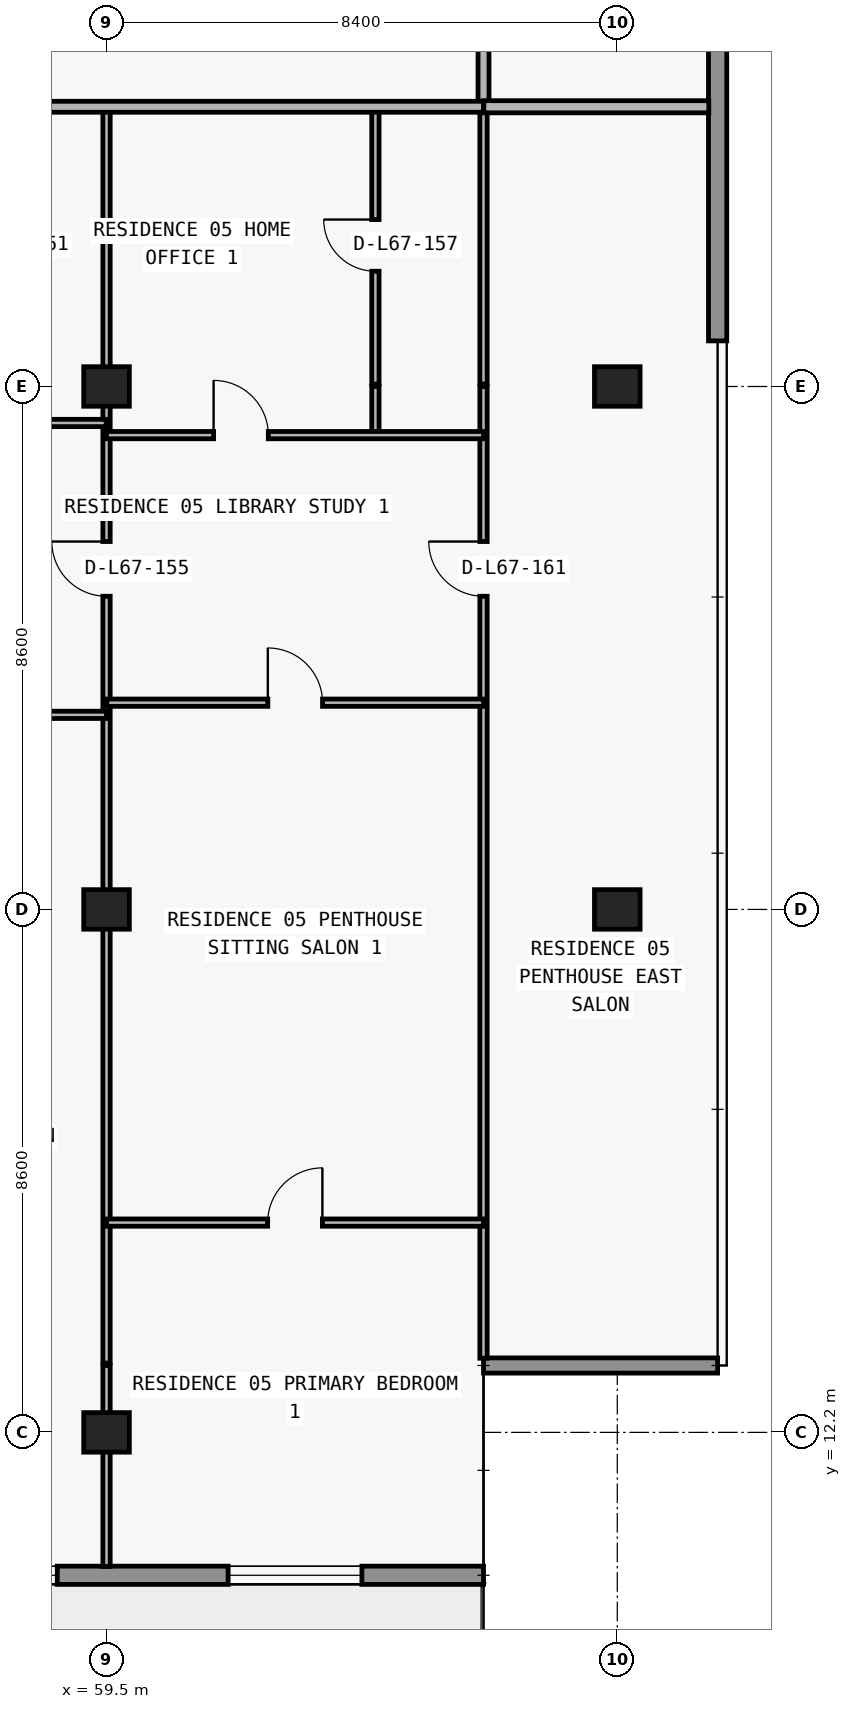
"""IFC4 building model, lengths in metres.
Left out: names, types, materials, properties, quantities, classifications, styles, units other than length and angle.
Written with IfcOpenShell. Run it as: python <this file> out.ifc"""

import sys

from ifc_helpers import new_model, si_unit, direction, frame, frame_2d, origin, origin_2d, place, context, subcontext, project, spatial, rectangle, extrude, element, fill, save


model = new_model("IFC4")
c1 = context("Model", 3, precision=1e-05, world=origin(), true_north=direction((0.0, 1.0)))
c2 = subcontext(c1, "Body", "Model", "MODEL_VIEW")
j1 = project(units=[si_unit("LENGTHUNIT", "METRE"), si_unit("PLANEANGLEUNIT", "RADIAN")], contexts=[c1])
p1 = place(None, origin())
s1 = spatial("IfcSite", under=j1, at=p1, CompositionType="ELEMENT")
p2 = place(p1, origin())
s2 = spatial("IfcBuilding", under=s1, at=p2, CompositionType="ELEMENT")
p3 = place(p2, frame((0.0, 0.0, 239.7)))
s3 = spatial("IfcBuildingStorey", under=s2, at=p3, CompositionType="ELEMENT", Elevation=239.7)
for number, where, z_axis, x_axis in (
    (1, (59.5, 12.2, 0.0), (0.0, 0.0, 1.0), (1.0, 0.0, 0.0)),
    (2, (59.5, 20.8, 0.0), (0.0, 0.0, 1.0), (1.0, 0.0, 0.0)),
    (3, (67.9, 20.8, 0.0), (0.0, 0.0, 1.0), (1.0, 0.0, 0.0)),
    (4, (59.5, 29.4, 0.0), (0.0, 0.0, 1.0), (1.0, 0.0, 0.0)),
    (5, (67.9, 29.4, 0.0), (0.0, 0.0, 1.0), (1.0, 0.0, 0.0)),
):
    element("IfcColumn", number, at=place(p3, frame(where, z_axis=z_axis, x_axis=x_axis)), inside=s3, PredefinedType="COLUMN", context=c2, shape_type="SweptSolid", body=[
        extrude(rectangle(XDim=0.75, YDim=0.65, at=origin_2d()), origin(), (0.0, 0.0, 1.0), 3.05),
    ])
p4 = place(p3, frame((65.7, 9.85, 0.0), z_axis=(0.0, 0.0, 1.0), x_axis=(-1.0, 0.0, 0.0)))
e6 = element("IfcWall", 6, at=p4, inside=s3, PredefinedType="STANDARD", context=c2, shape_type="SweptSolid", body=[
    extrude(rectangle(XDim=53.6, YDim=0.3, at=frame_2d((26.8, 0.0))), origin(), (0.0, 0.0, 1.0), 3.05),
])
p5 = place(p4, frame((49.5, 0.0, 0.0)))
e7 = element("IfcOpeningElement", 7, at=p5, cuts=e6, PredefinedType="OPENING", context=c2, shape_type="SweptSolid", body=[
    extrude(rectangle(XDim=2.0, YDim=2.3, at=frame_2d((1.0, 1.15))), frame((0.0, 0.16, 0.0), z_axis=(0.0, -1.0, 0.0), x_axis=(1.0, 0.0, 0.0)), (0.0, 0.0, 1.0), 0.32),
])
p6 = place(p4, frame((42.1, 0.0, 0.85)))
e8 = element("IfcOpeningElement", 8, at=p6, cuts=e6, PredefinedType="OPENING", context=c2, shape_type="SweptSolid", body=[
    extrude(rectangle(XDim=2.2, YDim=1.55, at=frame_2d((1.1, 0.775))), frame((0.0, 0.16, 0.0), z_axis=(0.0, -1.0, 0.0), x_axis=(1.0, 0.0, 0.0)), (0.0, 0.0, 1.0), 0.32),
])
p7 = place(p4, frame((35.69, 0.0, 0.0)))
e9 = element("IfcOpeningElement", 9, at=p7, cuts=e6, PredefinedType="OPENING", context=c2, shape_type="SweptSolid", body=[
    extrude(rectangle(XDim=2.0, YDim=2.3, at=frame_2d((1.0, 1.15))), frame((0.0, 0.16, 0.0), z_axis=(0.0, -1.0, 0.0), x_axis=(1.0, 0.0, 0.0)), (0.0, 0.0, 1.0), 0.32),
])
p8 = place(p4, frame((31.59, 0.0, 0.85)))
e10 = element("IfcOpeningElement", 10, at=p8, cuts=e6, PredefinedType="OPENING", context=c2, shape_type="SweptSolid", body=[
    extrude(rectangle(XDim=1.8, YDim=1.55, at=frame_2d((0.9, 0.775))), frame((0.0, 0.16, 0.0), z_axis=(0.0, -1.0, 0.0), x_axis=(1.0, 0.0, 0.0)), (0.0, 0.0, 1.0), 0.32),
])
p9 = place(p4, frame((23.914, 0.0, 0.85)))
e11 = element("IfcOpeningElement", 11, at=p9, cuts=e6, PredefinedType="OPENING", context=c2, shape_type="SweptSolid", body=[
    extrude(rectangle(XDim=2.2, YDim=1.55, at=frame_2d((1.1, 0.775))), frame((0.0, 0.16, 0.0), z_axis=(0.0, -1.0, 0.0), x_axis=(1.0, 0.0, 0.0)), (0.0, 0.0, 1.0), 0.32),
])
p10 = place(p4, frame((19.69, 0.0, 0.0)))
e12 = element("IfcOpeningElement", 12, at=p10, cuts=e6, PredefinedType="OPENING", context=c2, shape_type="SweptSolid", body=[
    extrude(rectangle(XDim=2.0, YDim=2.3, at=frame_2d((1.0, 1.15))), frame((0.0, 0.16, 0.0), z_axis=(0.0, -1.0, 0.0), x_axis=(1.0, 0.0, 0.0)), (0.0, 0.0, 1.0), 0.32),
])
p11 = place(p4, frame((15.59, 0.0, 0.85)))
e13 = element("IfcOpeningElement", 13, at=p11, cuts=e6, PredefinedType="OPENING", context=c2, shape_type="SweptSolid", body=[
    extrude(rectangle(XDim=1.8, YDim=1.55, at=frame_2d((0.9, 0.775))), frame((0.0, 0.16, 0.0), z_axis=(0.0, -1.0, 0.0), x_axis=(1.0, 0.0, 0.0)), (0.0, 0.0, 1.0), 0.32),
])
p12 = place(p4, frame((11.69, 0.0, 0.0)))
e14 = element("IfcOpeningElement", 14, at=p12, cuts=e6, PredefinedType="OPENING", context=c2, shape_type="SweptSolid", body=[
    extrude(rectangle(XDim=2.0, YDim=2.3, at=frame_2d((1.0, 1.15))), frame((0.0, 0.16, 0.0), z_axis=(0.0, -1.0, 0.0), x_axis=(1.0, 0.0, 0.0)), (0.0, 0.0, 1.0), 0.32),
])
p13 = place(p4, frame((7.01, 0.0, 0.65)))
e15 = element("IfcOpeningElement", 15, at=p13, cuts=e6, PredefinedType="OPENING", context=c2, shape_type="SweptSolid", body=[
    extrude(rectangle(XDim=2.6, YDim=1.85, at=frame_2d((1.3, 0.925))), frame((0.0, 0.16, 0.0), z_axis=(0.0, -1.0, 0.0), x_axis=(1.0, 0.0, 0.0)), (0.0, 0.0, 1.0), 0.32),
])
p14 = place(p4, frame((2.0, 0.0, 0.85)))
e16 = element("IfcOpeningElement", 16, at=p14, cuts=e6, PredefinedType="OPENING", context=c2, shape_type="SweptSolid", body=[
    extrude(rectangle(XDim=2.2, YDim=1.55, at=frame_2d((1.1, 0.775))), frame((0.0, 0.16, 0.0), z_axis=(0.0, -1.0, 0.0), x_axis=(1.0, 0.0, 0.0)), (0.0, 0.0, 1.0), 0.32),
])
p15 = place(p3, frame((65.7, 13.3, 0.0), z_axis=(0.0, 0.0, 1.0), x_axis=(1.0, 0.0, 0.0)))
e17 = element("IfcWall", 17, at=p15, inside=s3, PredefinedType="ELEMENTEDWALL", context=c2, shape_type="SweptSolid", body=[
    extrude(rectangle(XDim=3.85, YDim=0.25, at=frame_2d((1.925, 0.0))), origin(), (0.0, 0.0, 1.0), 3.05),
])
p16 = place(p3, frame((69.55, 47.0, 0.0), z_axis=(0.0, 0.0, 1.0), x_axis=(0.0, -1.0, 0.0)))
e18 = element("IfcWall", 18, at=p16, inside=s3, PredefinedType="STANDARD", context=c2, shape_type="SweptSolid", body=[
    extrude(rectangle(XDim=16.85, YDim=0.3, at=frame_2d((8.425, 0.0))), origin(), (0.0, 0.0, 1.0), 3.05),
])
p17 = place(p3, frame((59.5, 9.995, 0.0), z_axis=(0.0, 0.0, 1.0), x_axis=(0.0, 1.0, 0.0)))
e19 = element("IfcWall", 19, at=p17, inside=s3, PredefinedType="PARTITIONING", context=c2, shape_type="SweptSolid", body=[
    extrude(rectangle(XDim=3.305, YDim=0.12, at=frame_2d((1.652, 0.0))), origin(), (0.0, 0.0, 1.0), 2.263),
])
p18 = place(p3, frame((59.5, 13.34, 0.0), z_axis=(0.0, 0.0, 1.0), x_axis=(0.0, 1.0, 0.0)))
e20 = element("IfcWall", 20, at=p18, inside=s3, PredefinedType="PARTITIONING", context=c2, shape_type="SweptSolid", body=[
    extrude(rectangle(XDim=16.06, YDim=0.12, at=frame_2d((8.03, 0.0))), origin(), (0.0, 0.0, 1.0), 2.263),
])
p19 = place(p18, frame((12.61, 0.0, 0.0)))
e21 = element("IfcOpeningElement", 21, at=p19, cuts=e20, PredefinedType="OPENING", context=c2, shape_type="SweptSolid", body=[
    extrude(rectangle(XDim=0.9, YDim=2.15, at=frame_2d((0.45, 1.075))), frame((0.0, 0.07, 0.0), z_axis=(0.0, -1.0, 0.0), x_axis=(1.0, 0.0, 0.0)), (0.0, 0.0, 1.0), 0.14),
])
p20 = place(p3, frame((59.5, 29.44, 0.0), z_axis=(0.0, 0.0, 1.0), x_axis=(0.0, 1.0, 0.0)))
e22 = element("IfcWall", 22, at=p20, inside=s3, PredefinedType="PARTITIONING", context=c2, shape_type="SweptSolid", body=[
    extrude(rectangle(XDim=4.56, YDim=0.12, at=frame_2d((2.28, 0.0))), origin(), (0.0, 0.0, 1.0), 2.263),
])
p21 = place(p3, frame((63.922, 28.6, 0.0), z_axis=(0.0, 0.0, 1.0), x_axis=(0.0, 1.0, 0.0)))
e23 = element("IfcWall", 23, at=p21, inside=s3, PredefinedType="PARTITIONING", context=c2, shape_type="SweptSolid", body=[
    extrude(rectangle(XDim=0.8, YDim=0.12, at=frame_2d((0.4, 0.0))), origin(), (0.0, 0.0, 1.0), 2.629),
])
p22 = place(p3, frame((63.922, 29.44, 0.0), z_axis=(0.0, 0.0, 1.0), x_axis=(0.0, 1.0, 0.0)))
e24 = element("IfcWall", 24, at=p22, inside=s3, PredefinedType="PARTITIONING", context=c2, shape_type="SweptSolid", body=[
    extrude(rectangle(XDim=4.56, YDim=0.12, at=frame_2d((2.28, 0.0))), origin(), (0.0, 0.0, 1.0), 2.629),
])
p23 = place(p22, frame((1.855, 0.0, 0.0)))
e25 = element("IfcOpeningElement", 25, at=p23, cuts=e24, PredefinedType="OPENING", context=c2, shape_type="SweptSolid", body=[
    extrude(rectangle(XDim=0.85, YDim=2.1, at=frame_2d((0.425, 1.05))), frame((0.0, 0.07, 0.0), z_axis=(0.0, -1.0, 0.0), x_axis=(1.0, 0.0, 0.0)), (0.0, 0.0, 1.0), 0.14),
])
p24 = place(p3, frame((65.7, 13.42, 0.0), z_axis=(0.0, 0.0, 1.0), x_axis=(0.0, 1.0, 0.0)))
e26 = element("IfcWall", 26, at=p24, inside=s3, PredefinedType="PARTITIONING", context=c2, shape_type="SweptSolid", body=[
    extrude(rectangle(XDim=15.98, YDim=0.12, at=frame_2d((7.99, 0.0))), origin(), (0.0, 0.0, 1.0), 3.05),
])
p25 = place(p24, frame((12.53, 0.0, 0.0)))
e27 = element("IfcOpeningElement", 27, at=p25, cuts=e26, PredefinedType="OPENING", context=c2, shape_type="SweptSolid", body=[
    extrude(rectangle(XDim=0.9, YDim=2.15, at=frame_2d((0.45, 1.075))), frame((0.0, 0.07, 0.0), z_axis=(0.0, -1.0, 0.0), x_axis=(1.0, 0.0, 0.0)), (0.0, 0.0, 1.0), 0.14),
])
p26 = place(p3, frame((65.7, 29.44, 0.0), z_axis=(0.0, 0.0, 1.0), x_axis=(0.0, 1.0, 0.0)))
e28 = element("IfcWall", 28, at=p26, inside=s3, PredefinedType="PARTITIONING", context=c2, shape_type="SweptSolid", body=[
    extrude(rectangle(XDim=4.56, YDim=0.12, at=frame_2d((2.28, 0.0))), origin(), (0.0, 0.0, 1.0), 3.05),
])
p27 = place(p3, frame((65.7, 34.005, 0.0), z_axis=(0.0, 0.0, 1.0), x_axis=(0.0, 1.0, 0.0)))
e29 = element("IfcWall", 29, at=p27, inside=s3, PredefinedType="PARTITIONING", context=c2, shape_type="SweptSolid", body=[
    extrude(rectangle(XDim=2.995, YDim=0.18, at=frame_2d((1.498, 0.0))), origin(), (0.0, 0.0, 1.0), 3.05),
])
p28 = place(p3, frame((59.5, 15.65, 0.0), z_axis=(0.0, 0.0, 1.0), x_axis=(1.0, 0.0, 0.0)))
e30 = element("IfcWall", 30, at=p28, inside=s3, PredefinedType="PARTITIONING", context=c2, shape_type="SweptSolid", body=[
    extrude(rectangle(XDim=6.2, YDim=0.12, at=frame_2d((3.1, 0.0))), origin(), (0.0, 0.0, 1.0), 3.05),
])
p29 = place(p28, frame((2.65, 0.0, 0.0)))
e31 = element("IfcOpeningElement", 31, at=p29, cuts=e30, PredefinedType="OPENING", context=c2, shape_type="SweptSolid", body=[
    extrude(rectangle(XDim=0.9, YDim=2.15, at=frame_2d((0.45, 1.075))), frame((0.0, 0.07, 0.0), z_axis=(0.0, -1.0, 0.0), x_axis=(1.0, 0.0, 0.0)), (0.0, 0.0, 1.0), 0.14),
])
p30 = place(p3, frame((51.32, 24.0, 0.0), z_axis=(0.0, 0.0, 1.0), x_axis=(1.0, 0.0, 0.0)))
e32 = element("IfcWall", 32, at=p30, inside=s3, PredefinedType="PARTITIONING", context=c2, shape_type="SweptSolid", body=[
    extrude(rectangle(XDim=8.18, YDim=0.12, at=frame_2d((4.09, 0.0))), origin(), (0.0, 0.0, 1.0), 3.05),
])
p31 = place(p30, frame((1.33, 0.0, 0.0)))
e33 = element("IfcOpeningElement", 33, at=p31, cuts=e32, PredefinedType="OPENING", context=c2, shape_type="SweptSolid", body=[
    extrude(rectangle(XDim=0.9, YDim=2.15, at=frame_2d((0.45, 1.075))), frame((0.0, 0.07, 0.0), z_axis=(0.0, -1.0, 0.0), x_axis=(1.0, 0.0, 0.0)), (0.0, 0.0, 1.0), 0.14),
])
p32 = place(p3, frame((59.505, 24.2, 0.0), z_axis=(0.0, 0.0, 1.0), x_axis=(1.0, 0.0, 0.0)))
e34 = element("IfcWall", 34, at=p32, inside=s3, PredefinedType="PARTITIONING", context=c2, shape_type="SweptSolid", body=[
    extrude(rectangle(XDim=6.195, YDim=0.12, at=frame_2d((3.098, 0.0))), origin(), (0.0, 0.0, 1.0), 3.05),
])
p33 = place(p32, frame((2.647, 0.0, 0.0)))
e35 = element("IfcOpeningElement", 35, at=p33, cuts=e34, PredefinedType="OPENING", context=c2, shape_type="SweptSolid", body=[
    extrude(rectangle(XDim=0.9, YDim=2.15, at=frame_2d((0.45, 1.075))), frame((0.0, 0.07, 0.0), z_axis=(0.0, -1.0, 0.0), x_axis=(1.0, 0.0, 0.0)), (0.0, 0.0, 1.0), 0.14),
])
p34 = place(p3, frame((59.5, 28.6, 0.0), z_axis=(0.0, 0.0, 1.0), x_axis=(1.0, 0.0, 0.0)))
e36 = element("IfcWall", 36, at=p34, inside=s3, PredefinedType="PARTITIONING", context=c2, shape_type="SweptSolid", body=[
    extrude(rectangle(XDim=6.2, YDim=0.12, at=frame_2d((3.1, 0.0))), origin(), (0.0, 0.0, 1.0), 3.05),
])
p35 = place(p34, frame((1.761, 0.0, 0.0)))
e37 = element("IfcOpeningElement", 37, at=p35, cuts=e36, PredefinedType="OPENING", context=c2, shape_type="SweptSolid", body=[
    extrude(rectangle(XDim=0.9, YDim=2.15, at=frame_2d((0.45, 1.075))), frame((0.0, 0.07, 0.0), z_axis=(0.0, -1.0, 0.0), x_axis=(1.0, 0.0, 0.0)), (0.0, 0.0, 1.0), 0.14),
])
p36 = place(p3, frame((51.32, 28.8, 0.0), z_axis=(0.0, 0.0, 1.0), x_axis=(1.0, 0.0, 0.0)))
e38 = element("IfcWall", 38, at=p36, inside=s3, PredefinedType="PARTITIONING", context=c2, shape_type="SweptSolid", body=[
    extrude(rectangle(XDim=8.175, YDim=0.12, at=frame_2d((4.087, 0.0))), origin(), (0.0, 0.0, 1.0), 3.05),
])
p37 = place(p36, frame((1.33, 0.0, 0.0)))
e39 = element("IfcOpeningElement", 39, at=p37, cuts=e38, PredefinedType="OPENING", context=c2, shape_type="SweptSolid", body=[
    extrude(rectangle(XDim=0.9, YDim=2.15, at=frame_2d((0.45, 1.075))), frame((0.0, 0.07, 0.0), z_axis=(0.0, -1.0, 0.0), x_axis=(1.0, 0.0, 0.0)), (0.0, 0.0, 1.0), 0.14),
])
p38 = place(p3, frame((12.105, 34.0, 0.0), z_axis=(0.0, 0.0, 1.0), x_axis=(1.0, 0.0, 0.0)))
e40 = element("IfcWall", 40, at=p38, inside=s3, PredefinedType="PARTITIONING", context=c2, shape_type="SweptSolid", body=[
    extrude(rectangle(XDim=53.595, YDim=0.18, at=frame_2d((26.797, 0.0))), origin(), (0.0, 0.0, 1.0), 3.05),
])
p39 = place(p38, frame((1.607, 0.0, 0.0)))
e41 = element("IfcOpeningElement", 41, at=p39, cuts=e40, PredefinedType="OPENING", context=c2, shape_type="SweptSolid", body=[
    extrude(rectangle(XDim=1.0, YDim=2.2, at=frame_2d((0.5, 1.1))), frame((0.0, 0.1, 0.0), z_axis=(0.0, -1.0, 0.0), x_axis=(1.0, 0.0, 0.0)), (0.0, 0.0, 1.0), 0.2),
])
p40 = place(p38, frame((17.057, 0.0, 0.0)))
e42 = element("IfcOpeningElement", 42, at=p40, cuts=e40, PredefinedType="OPENING", context=c2, shape_type="SweptSolid", body=[
    extrude(rectangle(XDim=1.0, YDim=2.2, at=frame_2d((0.5, 1.1))), frame((0.0, 0.1, 0.0), z_axis=(0.0, -1.0, 0.0), x_axis=(1.0, 0.0, 0.0)), (0.0, 0.0, 1.0), 0.2),
])
p41 = place(p38, frame((25.242, 0.0, 0.0)))
e43 = element("IfcOpeningElement", 43, at=p41, cuts=e40, PredefinedType="OPENING", context=c2, shape_type="SweptSolid", body=[
    extrude(rectangle(XDim=1.0, YDim=2.2, at=frame_2d((0.5, 1.1))), frame((0.0, 0.1, 0.0), z_axis=(0.0, -1.0, 0.0), x_axis=(1.0, 0.0, 0.0)), (0.0, 0.0, 1.0), 0.2),
])
p42 = place(p38, frame((33.092, 0.0, 0.0)))
e44 = element("IfcOpeningElement", 44, at=p42, cuts=e40, PredefinedType="OPENING", context=c2, shape_type="SweptSolid", body=[
    extrude(rectangle(XDim=1.0, YDim=2.2, at=frame_2d((0.5, 1.1))), frame((0.0, 0.1, 0.0), z_axis=(0.0, -1.0, 0.0), x_axis=(1.0, 0.0, 0.0)), (0.0, 0.0, 1.0), 0.2),
])
p43 = place(p38, frame((41.705, 0.0, 0.0)))
e45 = element("IfcOpeningElement", 45, at=p43, cuts=e40, PredefinedType="OPENING", context=c2, shape_type="SweptSolid", body=[
    extrude(rectangle(XDim=1.0, YDim=2.2, at=frame_2d((0.5, 1.1))), frame((0.0, 0.1, 0.0), z_axis=(0.0, -1.0, 0.0), x_axis=(1.0, 0.0, 0.0)), (0.0, 0.0, 1.0), 0.2),
])
p44 = place(p3, frame((65.705, 34.0, 0.0), z_axis=(0.0, 0.0, 1.0), x_axis=(1.0, 0.0, 0.0)))
e46 = element("IfcWall", 46, at=p44, inside=s3, PredefinedType="PARTITIONING", context=c2, shape_type="SweptSolid", body=[
    extrude(rectangle(XDim=3.7, YDim=0.2, at=frame_2d((1.85, 0.0))), origin(), (0.0, 0.0, 1.0), 3.05),
])
p45 = place(p13, origin())
e47 = element("IfcWindow", 47, at=p45, inside=s3, PartitioningType="SINGLE_PANEL", PredefinedType="WINDOW", context=c2, shape_type="SweptSolid", body=[
    extrude(rectangle(XDim=2.6, YDim=1.85, at=frame_2d((1.3, 0.925))), frame((0.0, 0.03, 0.0), z_axis=(0.0, -1.0, 0.0), x_axis=(1.0, 0.0, 0.0)), (0.0, 0.0, 1.0), 0.06),
])
fill(e15, e47)
p46 = place(p14, origin())
e48 = element("IfcWindow", 48, at=p46, inside=s3, PartitioningType="SINGLE_PANEL", PredefinedType="WINDOW", context=c2, shape_type="SweptSolid", body=[
    extrude(rectangle(XDim=2.2, YDim=1.55, at=frame_2d((1.1, 0.775))), frame((0.0, 0.03, 0.0), z_axis=(0.0, -1.0, 0.0), x_axis=(1.0, 0.0, 0.0)), (0.0, 0.0, 1.0), 0.06),
])
fill(e16, e48)
p47 = place(p19, origin())
e49 = element("IfcDoor", 49, at=p47, inside=s3, OperationType="SINGLE_SWING_RIGHT", PredefinedType="DOOR", context=c2, shape_type="SweptSolid", body=[
    extrude(rectangle(XDim=0.9, YDim=2.15, at=frame_2d((0.45, 1.075))), frame((0.0, 0.025, 0.0), z_axis=(0.0, -1.0, 0.0), x_axis=(1.0, 0.0, 0.0)), (0.0, 0.0, 1.0), 0.05),
])
fill(e21, e49)
p48 = place(p35, origin())
e50 = element("IfcDoor", 50, at=p48, inside=s3, OperationType="SINGLE_SWING_LEFT", PredefinedType="DOOR", context=c2, shape_type="SweptSolid", body=[
    extrude(rectangle(XDim=0.9, YDim=2.15, at=frame_2d((0.45, 1.075))), frame((0.0, 0.025, 0.0), z_axis=(0.0, -1.0, 0.0), x_axis=(1.0, 0.0, 0.0)), (0.0, 0.0, 1.0), 0.05),
])
fill(e37, e50)
p49 = place(p23, origin())
e51 = element("IfcDoor", 51, at=p49, inside=s3, OperationType="SINGLE_SWING_RIGHT", PredefinedType="DOOR", context=c2, shape_type="SweptSolid", body=[
    extrude(rectangle(XDim=0.85, YDim=2.1, at=frame_2d((0.425, 1.05))), frame((0.0, 0.025, 0.0), z_axis=(0.0, -1.0, 0.0), x_axis=(1.0, 0.0, 0.0)), (0.0, 0.0, 1.0), 0.05),
])
fill(e25, e51)
p50 = place(p33, origin())
e52 = element("IfcDoor", 52, at=p50, inside=s3, OperationType="SINGLE_SWING_LEFT", PredefinedType="DOOR", context=c2, shape_type="SweptSolid", body=[
    extrude(rectangle(XDim=0.9, YDim=2.15, at=frame_2d((0.45, 1.075))), frame((0.0, 0.025, 0.0), z_axis=(0.0, -1.0, 0.0), x_axis=(1.0, 0.0, 0.0)), (0.0, 0.0, 1.0), 0.05),
])
fill(e35, e52)
p51 = place(p29, origin())
e53 = element("IfcDoor", 53, at=p51, inside=s3, OperationType="SINGLE_SWING_RIGHT", PredefinedType="DOOR", context=c2, shape_type="SweptSolid", body=[
    extrude(rectangle(XDim=0.9, YDim=2.15, at=frame_2d((0.45, 1.075))), frame((0.0, 0.025, 0.0), z_axis=(0.0, -1.0, 0.0), x_axis=(1.0, 0.0, 0.0)), (0.0, 0.0, 1.0), 0.05),
])
fill(e31, e53)
p52 = place(p25, origin())
e54 = element("IfcDoor", 54, at=p52, inside=s3, OperationType="SINGLE_SWING_RIGHT", PredefinedType="DOOR", context=c2, shape_type="SweptSolid", body=[
    extrude(rectangle(XDim=0.9, YDim=2.15, at=frame_2d((0.45, 1.075))), frame((0.0, 0.025, 0.0), z_axis=(0.0, -1.0, 0.0), x_axis=(1.0, 0.0, 0.0)), (0.0, 0.0, 1.0), 0.05),
])
fill(e27, e54)
save(model, sys.argv[1])
